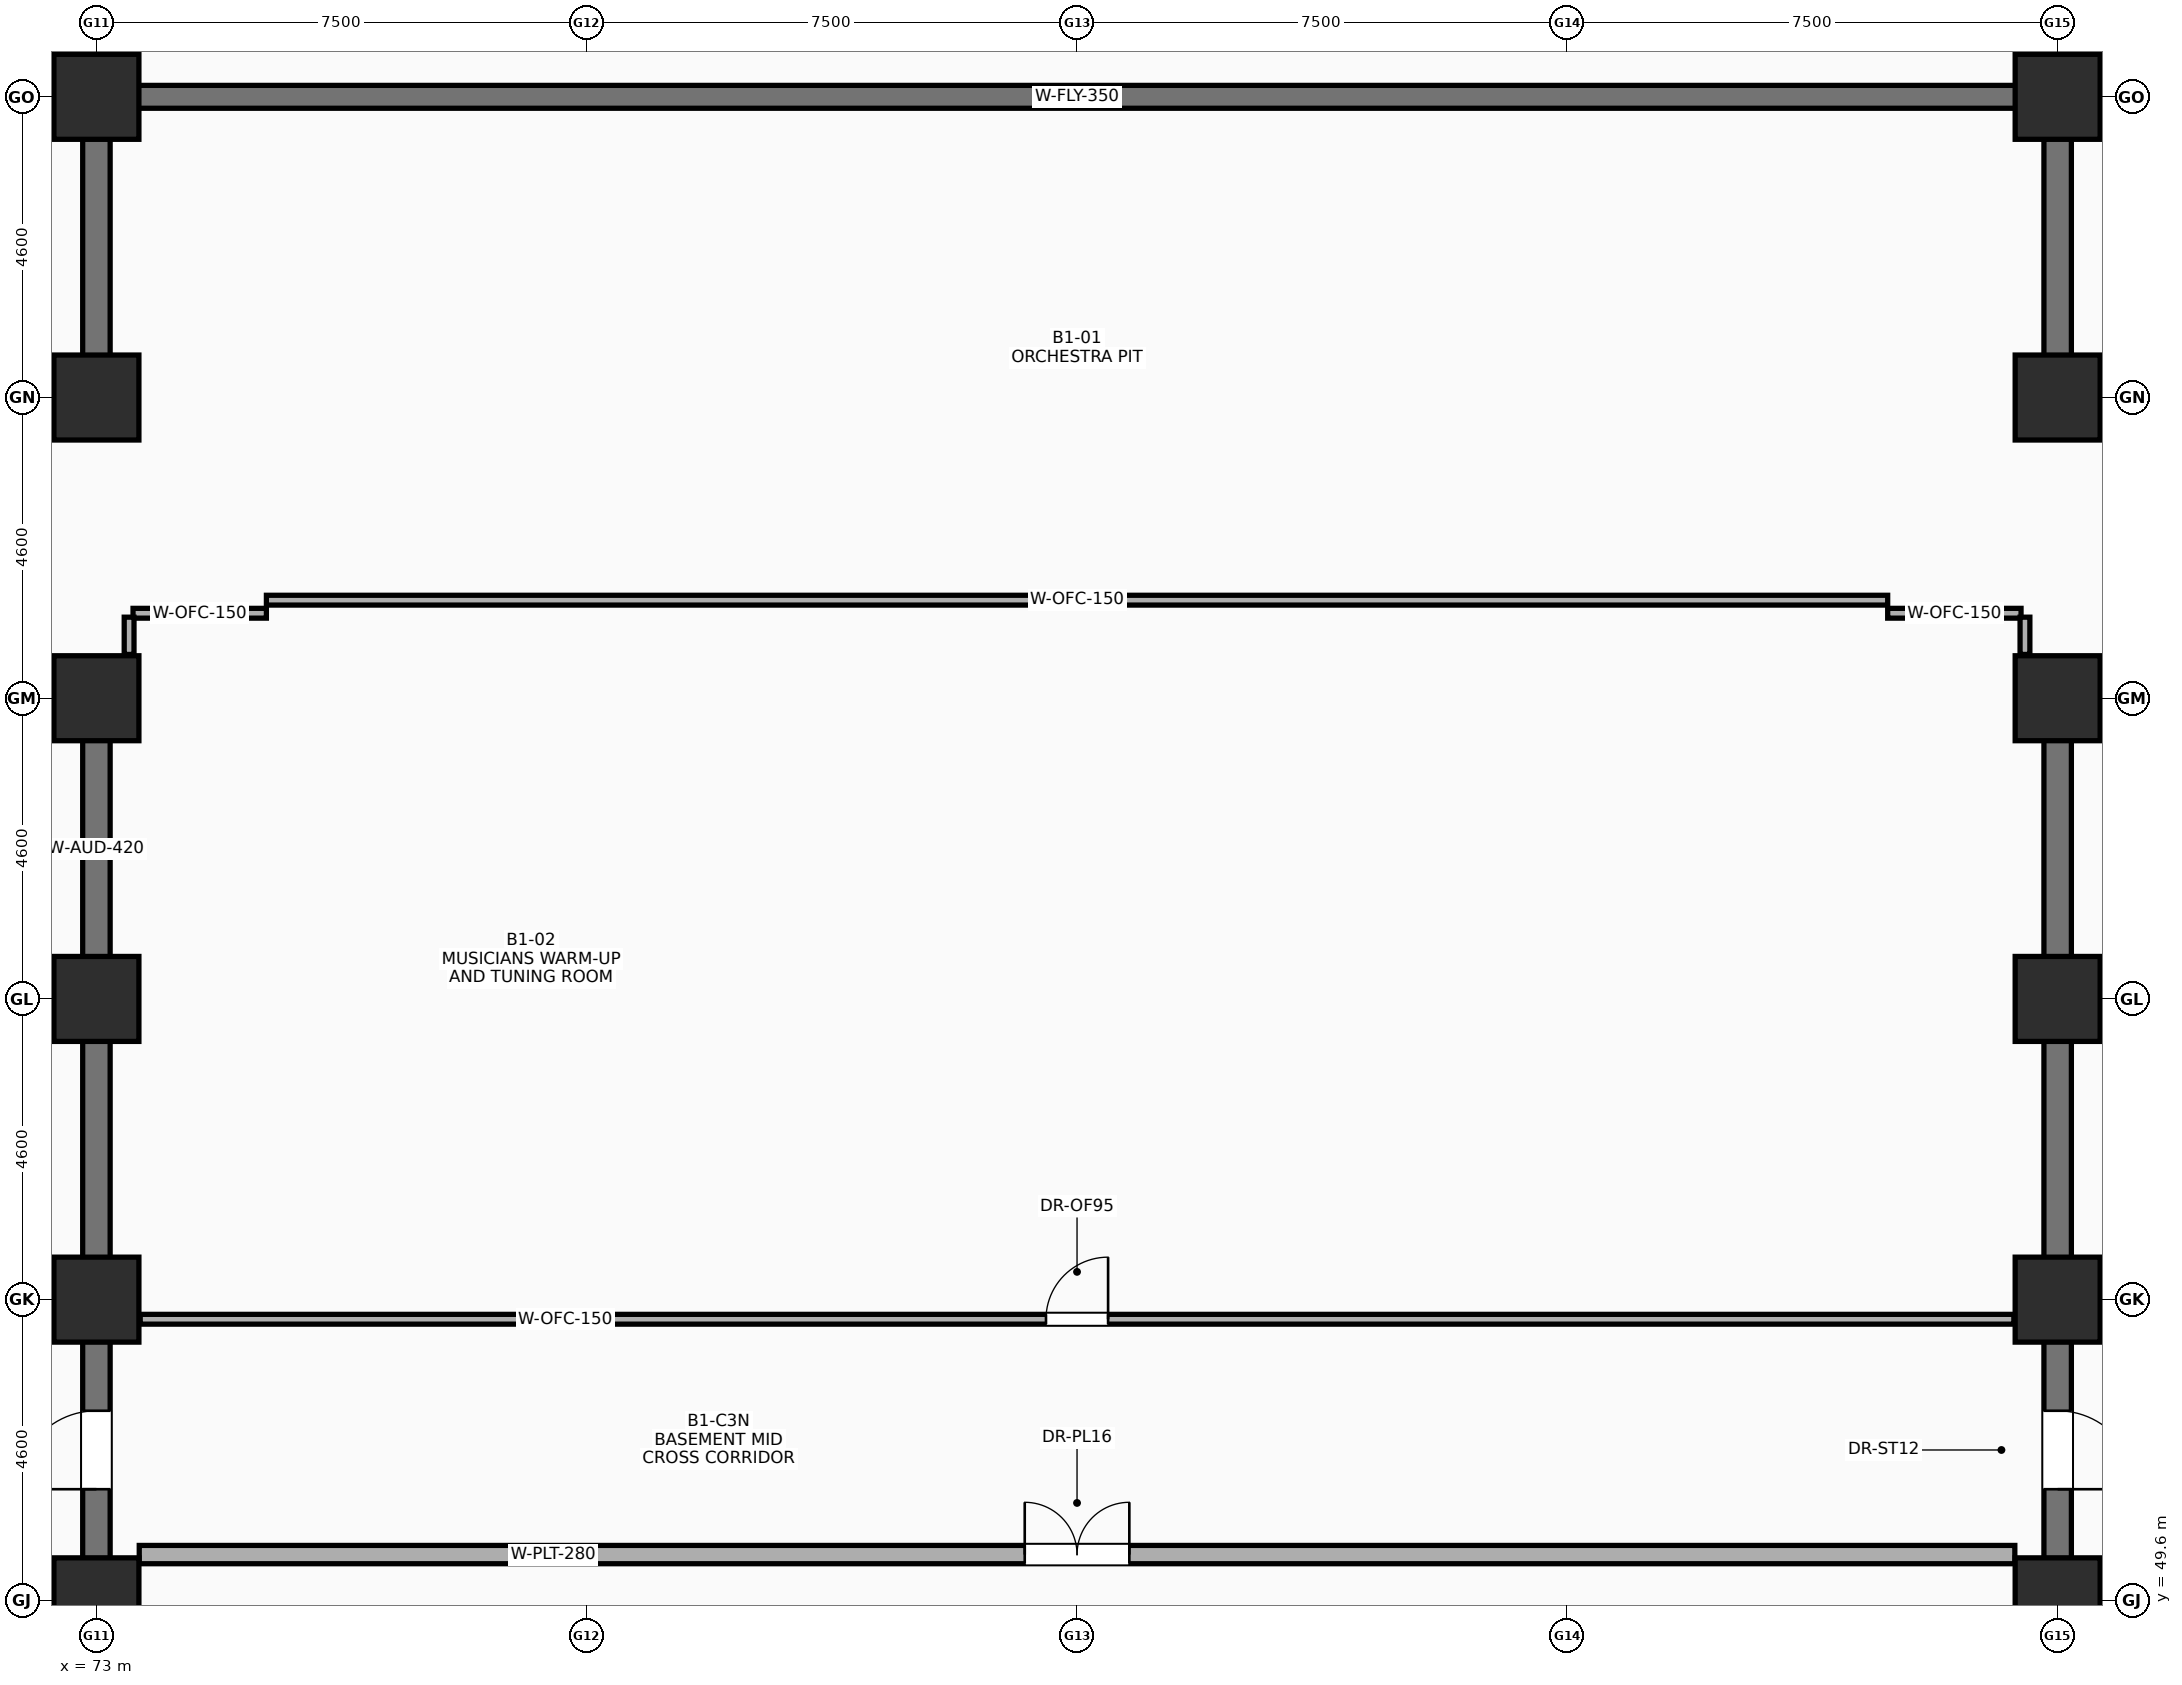
"""IFC4 building model, lengths in metres.
Left out: names, types, materials, properties, quantities, classifications, styles, units other than length and angle.
Written with IfcOpenShell. Run it as: python <this file> out.ifc"""

import sys

from ifc_helpers import new_model, si_unit, direction, frame, frame_2d, origin, origin_2d, place, context, subcontext, project, spatial, rectangle, extrude, element, fill, save


model = new_model("IFC4")
c1 = context("Model", 3, precision=1e-05, world=origin(), true_north=direction((0.0, 1.0)))
c2 = subcontext(c1, "Body", "Model", "MODEL_VIEW")
j1 = project(units=[si_unit("LENGTHUNIT", "METRE"), si_unit("PLANEANGLEUNIT", "RADIAN")], contexts=[c1])
p1 = place(None, origin())
s1 = spatial("IfcSite", under=j1, at=p1, CompositionType="ELEMENT")
p2 = place(p1, origin())
s2 = spatial("IfcBuilding", under=s1, at=p2, CompositionType="ELEMENT")
p3 = place(p2, frame((0.0, 0.0, -4.2)))
s3 = spatial("IfcBuildingStorey", under=s2, at=p3, CompositionType="ELEMENT", Elevation=-4.2)
for number, where, z_axis, x_axis in (
    (1, (73.0, 49.6, -0.42), (0.0, 0.0, 1.0), (1.0, 0.0, 0.0)),
    (2, (73.0, 54.2, -0.42), (0.0, 0.0, 1.0), (1.0, 0.0, 0.0)),
    (3, (73.0, 58.8, -0.42), (0.0, 0.0, 1.0), (1.0, 0.0, 0.0)),
    (4, (73.0, 63.4, -0.42), (0.0, 0.0, 1.0), (1.0, 0.0, 0.0)),
    (5, (73.0, 68.0, -0.42), (0.0, 0.0, 1.0), (1.0, 0.0, 0.0)),
    (6, (73.0, 72.6, -0.42), (0.0, 0.0, 1.0), (1.0, 0.0, 0.0)),
    (7, (103.0, 49.6, -0.42), (0.0, 0.0, 1.0), (1.0, 0.0, 0.0)),
    (8, (103.0, 54.2, -0.42), (0.0, 0.0, 1.0), (1.0, 0.0, 0.0)),
    (9, (103.0, 58.8, -0.42), (0.0, 0.0, 1.0), (1.0, 0.0, 0.0)),
    (10, (103.0, 63.4, -0.42), (0.0, 0.0, 1.0), (1.0, 0.0, 0.0)),
    (11, (103.0, 68.0, -0.42), (0.0, 0.0, 1.0), (1.0, 0.0, 0.0)),
    (12, (103.0, 72.6, -0.42), (0.0, 0.0, 1.0), (1.0, 0.0, 0.0)),
):
    element("IfcColumn", number, at=place(p3, frame(where, z_axis=z_axis, x_axis=x_axis)), inside=s3, PredefinedType="COLUMN", context=c2, shape_type="SweptSolid", body=[
        extrude(rectangle(XDim=1.3, YDim=1.3, at=origin_2d()), origin(), (0.0, 0.0, 1.0), 4.62),
    ])
for number, where, z_axis, x_axis in (
    (13, (65.5, 72.75, -0.42), (0.0, 0.0, 1.0), (1.0, 0.0, 0.0)),
    (14, (103.0, 72.75, -0.42), (0.0, 0.0, 1.0), (1.0, 0.0, 0.0)),
):
    element("IfcWall", number, at=place(p3, frame(where, z_axis=z_axis, x_axis=x_axis)), inside=s3, PredefinedType="SHEAR", context=c2, shape_type="SweptSolid", body=[
        extrude(rectangle(XDim=7.5, YDim=0.3, at=frame_2d((3.75, 0.0))), origin(), (0.0, 0.0, 1.0), 4.62),
    ])
p4 = place(p3, frame((73.0, 73.24, -0.42), z_axis=(0.0, 0.0, 1.0), x_axis=(0.0, 1.0, 0.0)))
e15 = element("IfcWall", 15, at=p4, inside=s3, PredefinedType="SHEAR", context=c2, shape_type="SweptSolid", body=[
    extrude(rectangle(XDim=24.72, YDim=0.35, at=frame_2d((12.36, 0.0))), origin(), (0.0, 0.0, 1.0), 4.62),
])
p5 = place(p3, frame((103.0, 73.24, -0.42), z_axis=(0.0, 0.0, 1.0), x_axis=(0.0, 1.0, 0.0)))
e16 = element("IfcWall", 16, at=p5, inside=s3, PredefinedType="SHEAR", context=c2, shape_type="SweptSolid", body=[
    extrude(rectangle(XDim=24.72, YDim=0.35, at=frame_2d((12.36, 0.0))), origin(), (0.0, 0.0, 1.0), 4.62),
])
p6 = place(p5, frame((17.1, 0.0, 0.42), z_axis=(0.0, 0.0, 1.0), x_axis=(-1.0, 0.0, 0.0)))
e17 = element("IfcOpeningElement", 17, at=p6, cuts=e16, PredefinedType="OPENING", context=c2, shape_type="SweptSolid", body=[
    extrude(rectangle(XDim=1.6, YDim=2.18, at=frame_2d((0.8, 1.09))), frame((0.0, 0.185, 0.0), z_axis=(0.0, -1.0, 0.0), x_axis=(1.0, 0.0, 0.0)), (0.0, 0.0, 1.0), 0.37),
])
p7 = place(p3, frame((73.64, 72.6, -0.42), z_axis=(0.0, 0.0, 1.0), x_axis=(1.0, 0.0, 0.0)))
e18 = element("IfcWall", 18, at=p7, inside=s3, PredefinedType="SHEAR", context=c2, shape_type="SweptSolid", body=[
    extrude(rectangle(XDim=28.72, YDim=0.35, at=frame_2d((14.36, 0.0))), origin(), (0.0, 0.0, 1.0), 4.62),
])
p8 = place(p3, frame((73.0, 50.24, -0.42), z_axis=(0.0, 0.0, 1.0), x_axis=(0.0, 1.0, 0.0)))
e19 = element("IfcWall", 19, at=p8, inside=s3, PredefinedType="SHEAR", context=c2, shape_type="SweptSolid", body=[
    extrude(rectangle(XDim=3.32, YDim=0.42, at=frame_2d((1.66, 0.0))), origin(), (0.0, 0.0, 1.0), 4.62),
])
p9 = place(p8, frame((1.06, 0.0, 0.42)))
e20 = element("IfcOpeningElement", 20, at=p9, cuts=e19, PredefinedType="OPENING", context=c2, shape_type="SweptSolid", body=[
    extrude(rectangle(XDim=1.2, YDim=2.15, at=frame_2d((0.6, 1.075))), frame((0.0, 0.22, 0.0), z_axis=(0.0, -1.0, 0.0), x_axis=(1.0, 0.0, 0.0)), (0.0, 0.0, 1.0), 0.44),
])
p10 = place(p3, frame((103.0, 50.24, -0.42), z_axis=(0.0, 0.0, 1.0), x_axis=(0.0, 1.0, 0.0)))
e21 = element("IfcWall", 21, at=p10, inside=s3, PredefinedType="SHEAR", context=c2, shape_type="SweptSolid", body=[
    extrude(rectangle(XDim=3.32, YDim=0.42, at=frame_2d((1.66, 0.0))), origin(), (0.0, 0.0, 1.0), 4.62),
])
p11 = place(p10, frame((2.26, 0.0, 0.42), z_axis=(0.0, 0.0, 1.0), x_axis=(-1.0, 0.0, 0.0)))
e22 = element("IfcOpeningElement", 22, at=p11, cuts=e21, PredefinedType="OPENING", context=c2, shape_type="SweptSolid", body=[
    extrude(rectangle(XDim=1.2, YDim=2.15, at=frame_2d((0.6, 1.075))), frame((0.0, 0.22, 0.0), z_axis=(0.0, -1.0, 0.0), x_axis=(1.0, 0.0, 0.0)), (0.0, 0.0, 1.0), 0.44),
])
for number, where, z_axis, x_axis in (
    (23, (73.0, 54.84, -0.42), (0.0, 0.0, 1.0), (0.0, 1.0, 0.0)),
    (24, (103.0, 54.84, -0.42), (0.0, 0.0, 1.0), (0.0, 1.0, 0.0)),
):
    element("IfcWall", number, at=place(p3, frame(where, z_axis=z_axis, x_axis=x_axis)), inside=s3, PredefinedType="SHEAR", context=c2, shape_type="SweptSolid", body=[
        extrude(rectangle(XDim=3.32, YDim=0.42, at=frame_2d((1.66, 0.0))), origin(), (0.0, 0.0, 1.0), 4.62),
    ])
for number, where, z_axis, x_axis in (
    (25, (73.0, 59.44, -0.42), (0.0, 0.0, 1.0), (0.0, 1.0, 0.0)),
    (26, (103.0, 59.44, -0.42), (0.0, 0.0, 1.0), (0.0, 1.0, 0.0)),
    (27, (73.0, 68.64, -0.42), (0.0, 0.0, 1.0), (0.0, 1.0, 0.0)),
    (28, (103.0, 68.64, -0.42), (0.0, 0.0, 1.0), (0.0, 1.0, 0.0)),
):
    element("IfcWall", number, at=place(p3, frame(where, z_axis=z_axis, x_axis=x_axis)), inside=s3, PredefinedType="SHEAR", context=c2, shape_type="SweptSolid", body=[
        extrude(rectangle(XDim=3.32, YDim=0.42, at=frame_2d((1.66, 0.0))), origin(), (0.0, 0.0, 1.0), 4.62),
    ])
p12 = place(p3, frame((75.6, 64.9, 0.0), z_axis=(0.0, 0.0, 1.0), x_axis=(1.0, 0.0, 0.0)))
e29 = element("IfcWall", 29, at=p12, inside=s3, PredefinedType="PARTITIONING", context=c2, shape_type="SweptSolid", body=[
    extrude(rectangle(XDim=24.8, YDim=0.15, at=frame_2d((12.4, 0.0))), origin(), (0.0, 0.0, 1.0), 3.82),
])
p13 = place(p3, frame((73.67, 53.9, 0.0), z_axis=(0.0, 0.0, 1.0), x_axis=(1.0, 0.0, 0.0)))
e30 = element("IfcWall", 30, at=p13, inside=s3, PredefinedType="PARTITIONING", context=c2, shape_type="SweptSolid", body=[
    extrude(rectangle(XDim=28.66, YDim=0.15, at=frame_2d((14.33, 0.0))), origin(), (0.0, 0.0, 1.0), 2.66),
])
p14 = place(p13, frame((13.855, 0.0, 0.0)))
e31 = element("IfcOpeningElement", 31, at=p14, cuts=e30, PredefinedType="OPENING", context=c2, shape_type="SweptSolid", body=[
    extrude(rectangle(XDim=0.95, YDim=2.15, at=frame_2d((0.475, 1.075))), frame((0.0, 0.085, 0.0), z_axis=(0.0, -1.0, 0.0), x_axis=(1.0, 0.0, 0.0)), (0.0, 0.0, 1.0), 0.17),
])
p15 = place(p3, frame((73.655, 50.3, 0.0), z_axis=(0.0, 0.0, 1.0), x_axis=(1.0, 0.0, 0.0)))
e32 = element("IfcWall", 32, at=p15, inside=s3, PredefinedType="SOLIDWALL", context=c2, shape_type="SweptSolid", body=[
    extrude(rectangle(XDim=28.69, YDim=0.28, at=frame_2d((14.345, 0.0))), origin(), (0.0, 0.0, 1.0), 3.82),
])
p16 = place(p15, frame((13.545, 0.0, 0.0)))
e33 = element("IfcOpeningElement", 33, at=p16, cuts=e32, PredefinedType="OPENING", context=c2, shape_type="SweptSolid", body=[
    extrude(rectangle(XDim=1.6, YDim=2.18, at=frame_2d((0.8, 1.09))), frame((0.0, 0.15, 0.0), z_axis=(0.0, -1.0, 0.0), x_axis=(1.0, 0.0, 0.0)), (0.0, 0.0, 1.0), 0.3),
])
for number, where, z_axis, x_axis in (
    (34, (73.56, 64.7, 0.0), (0.0, 0.0, 1.0), (1.0, 0.0, 0.0)),
    (35, (100.4, 64.7, 0.0), (0.0, 0.0, 1.0), (1.0, 0.0, 0.0)),
):
    element("IfcWall", number, at=place(p3, frame(where, z_axis=z_axis, x_axis=x_axis)), inside=s3, PredefinedType="PARTITIONING", context=c2, shape_type="SweptSolid", body=[
        extrude(rectangle(XDim=2.04, YDim=0.15, at=frame_2d((1.02, 0.0))), origin(), (0.0, 0.0, 1.0), 3.82),
    ])
for number, where, z_axis, x_axis in (
    (36, (73.5, 64.07, 0.0), (0.0, 0.0, 1.0), (0.0, 1.0, 0.0)),
    (37, (102.5, 64.07, 0.0), (0.0, 0.0, 1.0), (0.0, 1.0, 0.0)),
):
    element("IfcWall", number, at=place(p3, frame(where, z_axis=z_axis, x_axis=x_axis)), inside=s3, PredefinedType="PARTITIONING", context=c2, shape_type="SweptSolid", body=[
        extrude(rectangle(XDim=0.57, YDim=0.15, at=frame_2d((0.285, 0.0))), origin(), (0.0, 0.0, 1.0), 3.82),
    ])
p17 = place(p9, origin())
e38 = element("IfcDoor", 38, at=p17, inside=s3, OperationType="SINGLE_SWING_LEFT", PredefinedType="DOOR", context=c2, shape_type="SweptSolid", body=[
    extrude(rectangle(XDim=1.2, YDim=2.15, at=frame_2d((0.6, 1.075))), frame((0.0, 0.025, 0.0), z_axis=(0.0, -1.0, 0.0), x_axis=(1.0, 0.0, 0.0)), (0.0, 0.0, 1.0), 0.05),
])
fill(e20, e38)
p18 = place(p11, origin())
e39 = element("IfcDoor", 39, at=p18, inside=s3, OperationType="SINGLE_SWING_RIGHT", PredefinedType="DOOR", context=c2, shape_type="SweptSolid", body=[
    extrude(rectangle(XDim=1.2, YDim=2.15, at=frame_2d((0.6, 1.075))), frame((0.0, 0.025, 0.0), z_axis=(0.0, -1.0, 0.0), x_axis=(1.0, 0.0, 0.0)), (0.0, 0.0, 1.0), 0.05),
])
fill(e22, e39)
p19 = place(p14, origin())
e40 = element("IfcDoor", 40, at=p19, inside=s3, OperationType="SINGLE_SWING_RIGHT", PredefinedType="DOOR", context=c2, shape_type="SweptSolid", body=[
    extrude(rectangle(XDim=0.95, YDim=2.15, at=frame_2d((0.475, 1.075))), frame((0.0, 0.025, 0.0), z_axis=(0.0, -1.0, 0.0), x_axis=(1.0, 0.0, 0.0)), (0.0, 0.0, 1.0), 0.05),
])
fill(e31, e40)
p20 = place(p16, origin())
e41 = element("IfcDoor", 41, at=p20, inside=s3, OperationType="DOUBLE_DOOR_SINGLE_SWING", PredefinedType="DOOR", context=c2, shape_type="SweptSolid", body=[
    extrude(rectangle(XDim=1.6, YDim=2.18, at=frame_2d((0.8, 1.09))), frame((0.0, 0.025, 0.0), z_axis=(0.0, -1.0, 0.0), x_axis=(1.0, 0.0, 0.0)), (0.0, 0.0, 1.0), 0.05),
])
fill(e33, e41)
save(model, sys.argv[1])
